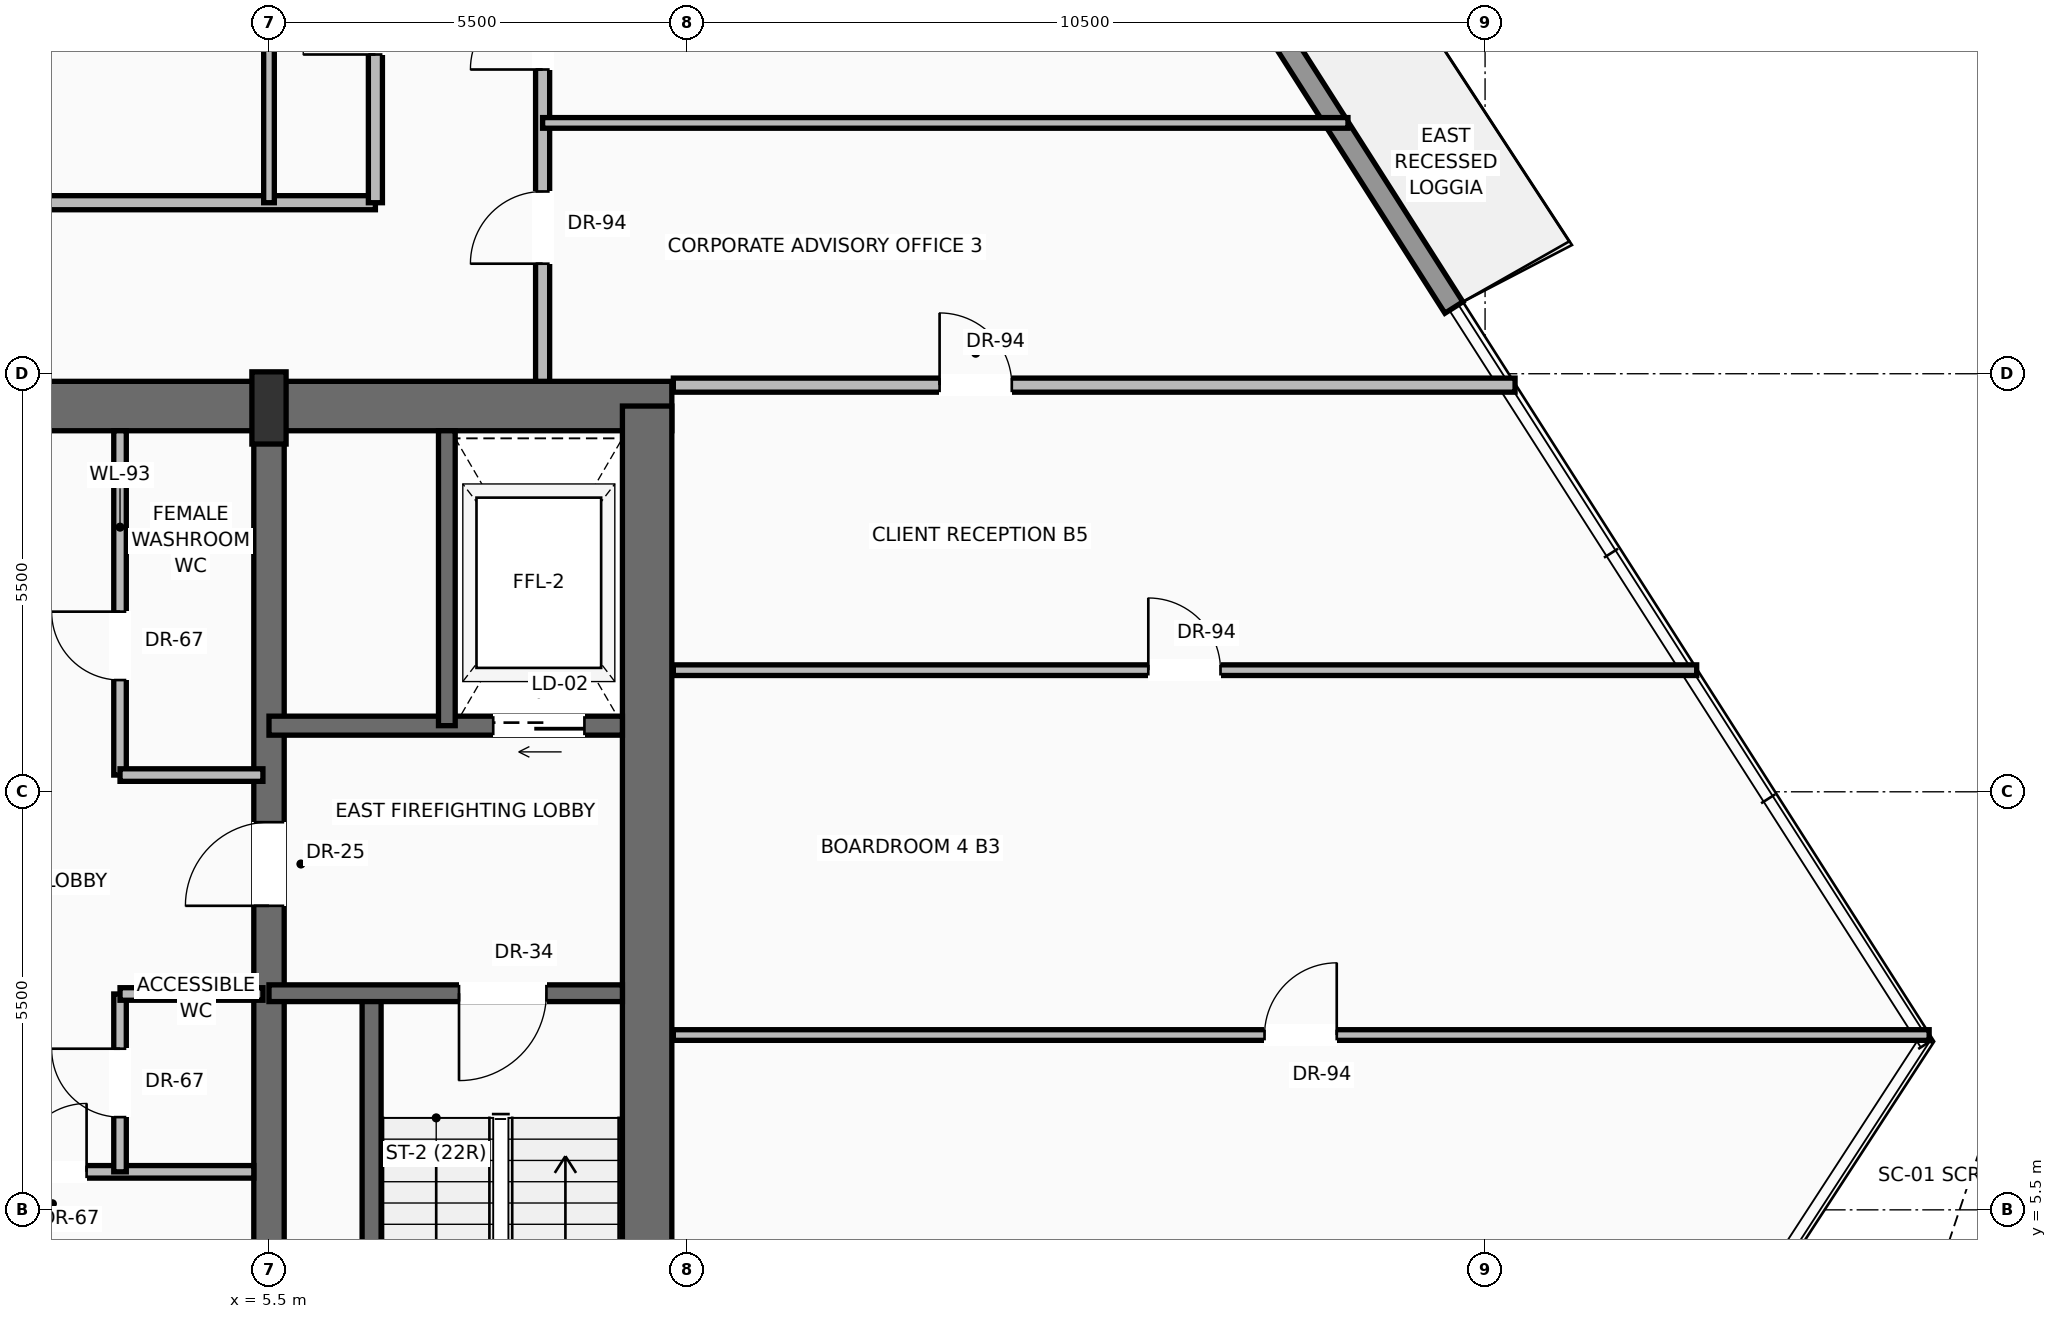
"""IFC4 building model, lengths in metres.
Left out: names, types, materials, properties, quantities, classifications, styles, units other than length and angle.
Written with IfcOpenShell. Run it as: python <this file> out.ifc"""

import sys

from ifc_helpers import new_model, si_unit, direction, frame, frame_2d, origin, origin_2d, place, context, subcontext, project, spatial, rectangle, extrude, source, transform, mapped, element, fill, save


model = new_model("IFC4")
c1 = context("Model", 3, precision=1e-05, world=origin(), true_north=direction((0.0, 1.0)))
c2 = subcontext(c1, "Body", "Model", "MODEL_VIEW")
j1 = project(units=[si_unit("LENGTHUNIT", "METRE"), si_unit("PLANEANGLEUNIT", "RADIAN")], contexts=[c1])
p1 = place(None, origin())
s1 = spatial("IfcSite", under=j1, at=p1, CompositionType="ELEMENT")
p2 = place(p1, origin())
s2 = spatial("IfcBuilding", under=s1, at=p2, CompositionType="ELEMENT")
p3 = place(p2, frame((0.0, 0.0, 140.4)))
s3 = spatial("IfcBuildingStorey", under=s2, at=p3, CompositionType="ELEMENT", Elevation=140.4)
p4 = place(p3, frame((-10.8, 16.075, 0.0), z_axis=(0.0, 0.0, 1.0), x_axis=(1.0, 0.0, 0.0)))
e1 = element("IfcWall", 1, at=p4, inside=s3, PredefinedType="SHEAR", context=c2, shape_type="SweptSolid", body=[
    extrude(rectangle(XDim=21.6, YDim=0.65, at=frame_2d((10.8, 0.0))), origin(), (0.0, 0.0, 1.0), 3.47),
])
p5 = place(p4, frame((3.37, 0.0, 0.0)))
e2 = element("IfcOpeningElement", 2, at=p5, cuts=e1, PredefinedType="OPENING", context=c2, shape_type="SweptSolid", body=[
    extrude(rectangle(XDim=1.3, YDim=2.3, at=frame_2d((0.65, 1.15))), frame((0.0, 0.335, 0.0), z_axis=(0.0, -1.0, 0.0), x_axis=(1.0, 0.0, 0.0)), (0.0, 0.0, 1.0), 0.67),
])
p6 = place(p4, frame((9.8, 0.0, 0.0)))
e3 = element("IfcOpeningElement", 3, at=p6, cuts=e1, PredefinedType="OPENING", context=c2, shape_type="SweptSolid", body=[
    extrude(rectangle(XDim=2.0, YDim=2.4, at=frame_2d((1.0, 1.2))), frame((0.0, 0.335, 0.0), z_axis=(0.0, -1.0, 0.0), x_axis=(1.0, 0.0, 0.0)), (0.0, 0.0, 1.0), 0.67),
])
p7 = place(p3, frame((10.475, 0.525, 0.0), z_axis=(0.0, 0.0, 1.0), x_axis=(0.0, 1.0, 0.0)))
e4 = element("IfcWall", 4, at=p7, inside=s3, PredefinedType="SHEAR", context=c2, shape_type="SweptSolid", body=[
    extrude(rectangle(XDim=15.55, YDim=0.65, at=frame_2d((7.775, 0.0))), origin(), (0.0, 0.0, 1.0), 3.47),
])
p8 = place(p3, frame((5.5, 0.525, 0.0), z_axis=(0.0, 0.0, 1.0), x_axis=(0.0, 1.0, 0.0)))
e5 = element("IfcWall", 5, at=p8, inside=s3, PredefinedType="SHEAR", context=c2, shape_type="SweptSolid", body=[
    extrude(rectangle(XDim=15.55, YDim=0.4, at=frame_2d((7.775, 0.0))), origin(), (0.0, 0.0, 1.0), 3.47),
])
p9 = place(p8, frame((8.975, 0.0, 0.0)))
e6 = element("IfcOpeningElement", 6, at=p9, cuts=e5, PredefinedType="OPENING", context=c2, shape_type="SweptSolid", body=[
    extrude(rectangle(XDim=1.1, YDim=2.2, at=frame_2d((0.55, 1.1))), frame((0.0, 0.21, 0.0), z_axis=(0.0, -1.0, 0.0), x_axis=(1.0, 0.0, 0.0)), (0.0, 0.0, 1.0), 0.42),
])
m1 = source(origin(), c2, "Body", "SweptSolid", [
    extrude(rectangle(XDim=0.45, YDim=0.95, at=origin_2d()), origin(), (0.0, 0.0, 1.0), 3.7),
])
p10 = place(p3, frame((5.5, 16.05, 0.0), z_axis=(0.0, 0.0, 1.0), x_axis=(1.0, 0.0, 0.0)))
e7 = element("IfcColumn", 7, at=p10, inside=s3, PredefinedType="PILASTER", context=c2, shape_type="MappedRepresentation", body=[
    mapped(m1, transform((0.0, 0.0, 0.0), scale=1.0)),
])
p11 = place(p3, frame((11.345, 32.663, 0.0), z_axis=(0.0, 0.0, 1.0), x_axis=(0.537390272984, -0.843333679217, 0.0)))
e8 = element("IfcWall", 8, at=p11, inside=s3, PredefinedType="SOLIDWALL", context=c2, shape_type="SweptSolid", body=[
    extrude(rectangle(XDim=18.133, YDim=0.28, at=frame_2d((9.066, 0.0))), origin(), (0.0, 0.0, 1.0), 3.05),
])
p12 = place(p11, frame((4.352, 0.0, 0.0)))
e9 = element("IfcOpeningElement", 9, at=p12, cuts=e8, PredefinedType="OPENING", context=c2, shape_type="SweptSolid", body=[
    extrude(rectangle(XDim=1.6, YDim=2.35, at=frame_2d((0.8, 1.175))), frame((0.0, 0.15, 0.0), z_axis=(0.0, -1.0, 0.0), x_axis=(1.0, 0.0, 0.0)), (0.0, 0.0, 1.0), 0.3),
])
p13 = place(p11, frame((12.33, 0.0, 0.9)))
e10 = element("IfcOpeningElement", 10, at=p13, cuts=e8, PredefinedType="OPENING", context=c2, shape_type="SweptSolid", body=[
    extrude(rectangle(XDim=1.55, YDim=1.85, at=frame_2d((0.775, 0.925))), frame((0.0, 0.15, 0.0), z_axis=(0.0, -1.0, 0.0), x_axis=(1.0, 0.0, 0.0)), (0.0, 0.0, 1.0), 0.3),
])
p14 = place(p3, frame((6.85, 0.85, 0.0), z_axis=(0.0, 0.0, 1.0), x_axis=(0.0, 1.0, 0.0)))
e11 = element("IfcWall", 11, at=p14, inside=s3, PredefinedType="SOLIDWALL", context=c2, shape_type="SweptSolid", body=[
    extrude(rectangle(XDim=7.5, YDim=0.25, at=frame_2d((3.75, 0.0))), origin(), (0.0, 0.0, 1.0), 3.47),
])
p15 = place(p3, frame((10.15, 8.35, 0.0), z_axis=(0.0, 0.0, 1.0), x_axis=(-1.0, 0.0, 0.0)))
e12 = element("IfcWall", 12, at=p15, inside=s3, PredefinedType="SOLIDWALL", context=c2, shape_type="SweptSolid", body=[
    extrude(rectangle(XDim=4.65, YDim=0.22, at=frame_2d((2.325, 0.0))), origin(), (0.0, 0.0, 1.0), 3.47),
])
p16 = place(p15, frame((1.0, 0.0, 0.0)))
e13 = element("IfcOpeningElement", 13, at=p16, cuts=e12, PredefinedType="OPENING", context=c2, shape_type="SweptSolid", body=[
    extrude(rectangle(XDim=1.15, YDim=2.2, at=frame_2d((0.575, 1.1))), frame((0.0, 0.12, 0.0), z_axis=(0.0, -1.0, 0.0), x_axis=(1.0, 0.0, 0.0)), (0.0, 0.0, 1.0), 0.24),
])
p17 = place(p3, frame((10.15, 11.87, 0.0), z_axis=(0.0, 0.0, 1.0), x_axis=(-1.0, 0.0, 0.0)))
e14 = element("IfcWall", 14, at=p17, inside=s3, PredefinedType="SOLIDWALL", context=c2, shape_type="SweptSolid", body=[
    extrude(rectangle(XDim=4.65, YDim=0.25, at=frame_2d((2.325, 0.0))), origin(), (0.0, 0.0, 1.0), 3.47),
])
p18 = place(p17, frame((0.5, 0.0, 0.0)))
e15 = element("IfcOpeningElement", 15, at=p18, cuts=e14, PredefinedType="OPENING", context=c2, shape_type="SweptSolid", body=[
    extrude(rectangle(XDim=1.2, YDim=2.25, at=frame_2d((0.6, 1.125))), frame((0.0, 0.135, 0.0), z_axis=(0.0, -1.0, 0.0), x_axis=(1.0, 0.0, 0.0)), (0.0, 0.0, 1.0), 0.27),
])
p19 = place(p3, frame((7.84, 11.87, 0.0), z_axis=(0.0, 0.0, 1.0), x_axis=(0.0, 1.0, 0.0)))
e16 = element("IfcWall", 16, at=p19, inside=s3, PredefinedType="SOLIDWALL", context=c2, shape_type="SweptSolid", body=[
    extrude(rectangle(XDim=3.88, YDim=0.22, at=frame_2d((1.94, 0.0))), origin(), (0.0, 0.0, 1.0), 3.47),
])
p20 = place(p3, frame((1.82, 6.0, 0.0), z_axis=(0.0, 0.0, 1.0), x_axis=(1.0, 0.0, 0.0)))
e17 = element("IfcWall", 17, at=p20, inside=s3, PredefinedType="PARTITIONING", context=c2, shape_type="SweptSolid", body=[
    extrude(rectangle(XDim=3.48, YDim=0.165, at=frame_2d((1.74, 0.0))), origin(), (0.0, 0.0, 1.0), 3.462),
])
p21 = place(p20, frame((0.38, 0.0, 0.0)))
e18 = element("IfcOpeningElement", 18, at=p21, cuts=e17, PredefinedType="OPENING", context=c2, shape_type="SweptSolid", body=[
    extrude(rectangle(XDim=0.9, YDim=2.1, at=frame_2d((0.45, 1.05))), frame((0.0, 0.093, 0.0), z_axis=(0.0, -1.0, 0.0), x_axis=(1.0, 0.0, 0.0)), (0.0, 0.0, 1.0), 0.185),
])
p22 = place(p3, frame((3.54, 6.0, 0.0), z_axis=(0.0, 0.0, 1.0), x_axis=(0.0, 1.0, 0.0)))
e19 = element("IfcWall", 19, at=p22, inside=s3, PredefinedType="PARTITIONING", context=c2, shape_type="SweptSolid", body=[
    extrude(rectangle(XDim=2.34, YDim=0.165, at=frame_2d((1.17, 0.0))), origin(), (0.0, 0.0, 1.0), 3.462),
])
p23 = place(p22, frame((0.72, 0.0, 0.0)))
e20 = element("IfcOpeningElement", 20, at=p23, cuts=e19, PredefinedType="OPENING", context=c2, shape_type="SweptSolid", body=[
    extrude(rectangle(XDim=0.9, YDim=2.1, at=frame_2d((0.45, 1.05))), frame((0.0, 0.093, 0.0), z_axis=(0.0, -1.0, 0.0), x_axis=(1.0, 0.0, 0.0)), (0.0, 0.0, 1.0), 0.185),
])
p24 = place(p3, frame((3.54, 8.34, 0.0), z_axis=(0.0, 0.0, 1.0), x_axis=(1.0, 0.0, 0.0)))
e21 = element("IfcWall", 21, at=p24, inside=s3, PredefinedType="PARTITIONING", context=c2, shape_type="SweptSolid", body=[
    extrude(rectangle(XDim=1.88, YDim=0.165, at=frame_2d((0.94, 0.0))), origin(), (0.0, 0.0, 1.0), 3.462),
])
p25 = place(p3, frame((3.54, 11.22, 0.0), z_axis=(0.0, 0.0, 1.0), x_axis=(0.0, 1.0, 0.0)))
e22 = element("IfcWall", 22, at=p25, inside=s3, PredefinedType="PARTITIONING", context=c2, shape_type="SweptSolid", body=[
    extrude(rectangle(XDim=4.53, YDim=0.165, at=frame_2d((2.265, 0.0))), origin(), (0.0, 0.0, 1.0), 3.462),
])
p26 = place(p25, frame((1.25, 0.0, 0.0)))
e23 = element("IfcOpeningElement", 23, at=p26, cuts=e22, PredefinedType="OPENING", context=c2, shape_type="SweptSolid", body=[
    extrude(rectangle(XDim=0.9, YDim=2.1, at=frame_2d((0.45, 1.05))), frame((0.0, 0.093, 0.0), z_axis=(0.0, -1.0, 0.0), x_axis=(1.0, 0.0, 0.0)), (0.0, 0.0, 1.0), 0.185),
])
p27 = place(p3, frame((3.54, 11.22, 0.0), z_axis=(0.0, 0.0, 1.0), x_axis=(1.0, 0.0, 0.0)))
e24 = element("IfcWall", 24, at=p27, inside=s3, PredefinedType="PARTITIONING", context=c2, shape_type="SweptSolid", body=[
    extrude(rectangle(XDim=1.88, YDim=0.165, at=frame_2d((0.94, 0.0))), origin(), (0.0, 0.0, 1.0), 3.462),
])
p28 = place(p3, frame((-7.2, 18.75, 0.0), z_axis=(0.0, 0.0, 1.0), x_axis=(1.0, 0.0, 0.0)))
e25 = element("IfcWall", 25, at=p28, inside=s3, PredefinedType="PARTITIONING", context=c2, shape_type="SweptSolid", body=[
    extrude(rectangle(XDim=14.1, YDim=0.185, at=frame_2d((7.05, 0.0))), origin(), (0.0, 0.0, 1.0), 2.846),
])
p29 = place(p28, frame((6.575, 0.0, 0.0)))
e26 = element("IfcOpeningElement", 26, at=p29, cuts=e25, PredefinedType="OPENING", context=c2, shape_type="SweptSolid", body=[
    extrude(rectangle(XDim=0.95, YDim=2.2, at=frame_2d((0.475, 1.1))), frame((0.0, 0.103, 0.0), z_axis=(0.0, -1.0, 0.0), x_axis=(1.0, 0.0, 0.0)), (0.0, 0.0, 1.0), 0.205),
])
p30 = place(p3, frame((6.9, 18.75, 0.0), z_axis=(0.0, 0.0, 1.0), x_axis=(0.0, 1.0, 0.0)))
e27 = element("IfcWall", 27, at=p30, inside=s3, PredefinedType="PARTITIONING", context=c2, shape_type="SweptSolid", body=[
    extrude(rectangle(XDim=4.85, YDim=0.185, at=frame_2d((2.425, 0.0))), origin(), (0.0, 0.0, 1.0), 3.462),
])
p31 = place(p30, frame((1.95, 0.0, 0.0)))
e28 = element("IfcOpeningElement", 28, at=p31, cuts=e27, PredefinedType="OPENING", context=c2, shape_type="SweptSolid", body=[
    extrude(rectangle(XDim=0.95, YDim=2.2, at=frame_2d((0.475, 1.1))), frame((0.0, 0.103, 0.0), z_axis=(0.0, -1.0, 0.0), x_axis=(1.0, 0.0, 0.0)), (0.0, 0.0, 1.0), 0.205),
])
p32 = place(p3, frame((9.1, 16.4, 0.0), z_axis=(0.0, 0.0, 1.0), x_axis=(0.0, 1.0, 0.0)))
e29 = element("IfcWall", 29, at=p32, inside=s3, PredefinedType="PARTITIONING", context=c2, shape_type="SweptSolid", body=[
    extrude(rectangle(XDim=7.2, YDim=0.185, at=frame_2d((3.6, 0.0))), origin(), (0.0, 0.0, 1.0), 3.462),
])
p33 = place(p32, frame((4.103, 0.0, 0.0)))
e30 = element("IfcOpeningElement", 30, at=p33, cuts=e29, PredefinedType="OPENING", context=c2, shape_type="SweptSolid", body=[
    extrude(rectangle(XDim=0.95, YDim=2.2, at=frame_2d((0.475, 1.1))), frame((0.0, 0.103, 0.0), z_axis=(0.0, -1.0, 0.0), x_axis=(1.0, 0.0, 0.0)), (0.0, 0.0, 1.0), 0.205),
])
p34 = place(p32, frame((1.548, 0.0, 0.0)))
e31 = element("IfcOpeningElement", 31, at=p34, cuts=e29, PredefinedType="OPENING", context=c2, shape_type="SweptSolid", body=[
    extrude(rectangle(XDim=0.95, YDim=2.2, at=frame_2d((0.475, 1.1))), frame((0.0, 0.103, 0.0), z_axis=(0.0, -1.0, 0.0), x_axis=(1.0, 0.0, 0.0)), (0.0, 0.0, 1.0), 0.205),
])
p35 = place(p3, frame((10.82, 16.35, 0.0), z_axis=(0.0, 0.0, 1.0), x_axis=(1.0, 0.0, 0.0)))
e32 = element("IfcWall", 32, at=p35, inside=s3, PredefinedType="PARTITIONING", context=c2, shape_type="SweptSolid", body=[
    extrude(rectangle(XDim=11.074, YDim=0.185, at=frame_2d((5.537, 0.0))), origin(), (0.0, 0.0, 1.0), 3.462),
])
p36 = place(p35, frame((3.503, 0.0, 0.0)))
e33 = element("IfcOpeningElement", 33, at=p36, cuts=e32, PredefinedType="OPENING", context=c2, shape_type="SweptSolid", body=[
    extrude(rectangle(XDim=0.95, YDim=2.2, at=frame_2d((0.475, 1.1))), frame((0.0, 0.103, 0.0), z_axis=(0.0, -1.0, 0.0), x_axis=(1.0, 0.0, 0.0)), (0.0, 0.0, 1.0), 0.205),
])
p37 = place(p3, frame((5.5, 18.75, 0.0), z_axis=(0.0, 0.0, 1.0), x_axis=(0.0, 1.0, 0.0)))
e34 = element("IfcWall", 34, at=p37, inside=s3, PredefinedType="PARTITIONING", context=c2, shape_type="SweptSolid", body=[
    extrude(rectangle(XDim=13.75, YDim=0.14, at=frame_2d((6.875, 0.0))), origin(), (0.0, 0.0, 1.0), 2.846),
])
p38 = place(p3, frame((10.82, 7.8, 0.0), z_axis=(0.0, 0.0, 1.0), x_axis=(1.0, 0.0, 0.0)))
e35 = element("IfcWall", 35, at=p38, inside=s3, PredefinedType="PARTITIONING", context=c2, shape_type="SweptSolid", body=[
    extrude(rectangle(XDim=16.523, YDim=0.14, at=frame_2d((8.261, 0.0))), origin(), (0.0, 0.0, 1.0), 3.462),
])
p39 = place(p38, frame((7.778, 0.0, 0.0)))
e36 = element("IfcOpeningElement", 36, at=p39, cuts=e35, PredefinedType="OPENING", context=c2, shape_type="SweptSolid", body=[
    extrude(rectangle(XDim=0.95, YDim=2.2, at=frame_2d((0.475, 1.1))), frame((0.0, 0.08, 0.0), z_axis=(0.0, -1.0, 0.0), x_axis=(1.0, 0.0, 0.0)), (0.0, 0.0, 1.0), 0.16),
])
p40 = place(p3, frame((10.82, 12.6, 0.0), z_axis=(0.0, 0.0, 1.0), x_axis=(1.0, 0.0, 0.0)))
e37 = element("IfcWall", 37, at=p40, inside=s3, PredefinedType="PARTITIONING", context=c2, shape_type="SweptSolid", body=[
    extrude(rectangle(XDim=13.464, YDim=0.14, at=frame_2d((6.732, 0.0))), origin(), (0.0, 0.0, 1.0), 3.462),
])
p41 = place(p40, frame((6.249, 0.0, 0.0)))
e38 = element("IfcOpeningElement", 38, at=p41, cuts=e37, PredefinedType="OPENING", context=c2, shape_type="SweptSolid", body=[
    extrude(rectangle(XDim=0.95, YDim=2.2, at=frame_2d((0.475, 1.1))), frame((0.0, 0.08, 0.0), z_axis=(0.0, -1.0, 0.0), x_axis=(1.0, 0.0, 0.0)), (0.0, 0.0, 1.0), 0.16),
])
p42 = place(p3, frame((9.1, 19.8, 0.0), z_axis=(0.0, 0.0, 1.0), x_axis=(1.0, 0.0, 0.0)))
e39 = element("IfcWall", 39, at=p42, inside=s3, PredefinedType="PARTITIONING", context=c2, shape_type="SweptSolid", body=[
    extrude(rectangle(XDim=10.596, YDim=0.14, at=frame_2d((5.298, 0.0))), origin(), (0.0, 0.0, 1.0), 3.462),
])
m2 = source(origin(), c2, "Body", "SweptSolid", [
    extrude(rectangle(XDim=1.15, YDim=2.2, at=frame_2d((0.575, 1.1))), frame((0.0, 0.025, 0.0), z_axis=(0.0, -1.0, 0.0), x_axis=(1.0, 0.0, 0.0)), (0.0, 0.0, 1.0), 0.05),
])
p43 = place(p16, origin())
e40 = element("IfcDoor", 40, at=p43, inside=s3, OperationType="SINGLE_SWING_RIGHT", PredefinedType="DOOR", context=c2, shape_type="MappedRepresentation", body=[
    mapped(m2, transform((0.0, 0.0, 0.0), scale=1.0)),
])
fill(e13, e40)
m3 = source(origin(), c2, "Body", "SweptSolid", [
    extrude(rectangle(XDim=1.1, YDim=2.2, at=frame_2d((0.55, 1.1))), frame((0.0, 0.025, 0.0), z_axis=(0.0, -1.0, 0.0), x_axis=(1.0, 0.0, 0.0)), (0.0, 0.0, 1.0), 0.05),
])
p44 = place(p9, origin())
e41 = element("IfcDoor", 41, at=p44, inside=s3, OperationType="SINGLE_SWING_LEFT", PredefinedType="DOOR", context=c2, shape_type="MappedRepresentation", body=[
    mapped(m3, transform((0.0, 0.0, 0.0), scale=1.0)),
])
fill(e6, e41)
m4 = source(origin(), c2, "Body", "SweptSolid", [
    extrude(rectangle(XDim=1.2, YDim=2.25, at=frame_2d((0.6, 1.125))), frame((0.0, 0.025, 0.0), z_axis=(0.0, -1.0, 0.0), x_axis=(1.0, 0.0, 0.0)), (0.0, 0.0, 1.0), 0.05),
])
p45 = place(p18, origin())
e42 = element("IfcDoor", 42, at=p45, inside=s3, OperationType="SLIDING_TO_RIGHT", PredefinedType="DOOR", context=c2, shape_type="MappedRepresentation", body=[
    mapped(m4, transform((0.0, 0.0, 0.0), scale=1.0)),
])
fill(e15, e42)
m5 = source(origin(), c2, "Body", "SweptSolid", [
    extrude(rectangle(XDim=0.9, YDim=2.1, at=frame_2d((0.45, 1.05))), frame((0.0, 0.025, 0.0), z_axis=(0.0, -1.0, 0.0), x_axis=(1.0, 0.0, 0.0)), (0.0, 0.0, 1.0), 0.05),
])
p46 = place(p21, origin())
e43 = element("IfcDoor", 43, at=p46, inside=s3, OperationType="SINGLE_SWING_RIGHT", PredefinedType="DOOR", context=c2, shape_type="MappedRepresentation", body=[
    mapped(m5, transform((0.0, 0.0, 0.0), scale=1.0)),
])
fill(e18, e43)
p47 = place(p23, origin())
e44 = element("IfcDoor", 44, at=p47, inside=s3, OperationType="SINGLE_SWING_RIGHT", PredefinedType="DOOR", context=c2, shape_type="MappedRepresentation", body=[
    mapped(m5, transform((0.0, 0.0, 0.0), scale=1.0)),
])
fill(e20, e44)
p48 = place(p26, origin())
e45 = element("IfcDoor", 45, at=p48, inside=s3, OperationType="SINGLE_SWING_RIGHT", PredefinedType="DOOR", context=c2, shape_type="MappedRepresentation", body=[
    mapped(m5, transform((0.0, 0.0, 0.0), scale=1.0)),
])
fill(e23, e45)
m6 = source(origin(), c2, "Body", "SweptSolid", [
    extrude(rectangle(XDim=0.95, YDim=2.2, at=frame_2d((0.475, 1.1))), frame((0.0, 0.025, 0.0), z_axis=(0.0, -1.0, 0.0), x_axis=(1.0, 0.0, 0.0)), (0.0, 0.0, 1.0), 0.05),
])
p49 = place(p33, origin())
e46 = element("IfcDoor", 46, at=p49, inside=s3, OperationType="SINGLE_SWING_LEFT", PredefinedType="DOOR", context=c2, shape_type="MappedRepresentation", body=[
    mapped(m6, transform((0.0, 0.0, 0.0), scale=1.0)),
])
fill(e30, e46)
p50 = place(p36, origin())
e47 = element("IfcDoor", 47, at=p50, inside=s3, OperationType="SINGLE_SWING_LEFT", PredefinedType="DOOR", context=c2, shape_type="MappedRepresentation", body=[
    mapped(m6, transform((0.0, 0.0, 0.0), scale=1.0)),
])
fill(e33, e47)
p51 = place(p34, origin())
e48 = element("IfcDoor", 48, at=p51, inside=s3, OperationType="SINGLE_SWING_LEFT", PredefinedType="DOOR", context=c2, shape_type="MappedRepresentation", body=[
    mapped(m6, transform((0.0, 0.0, 0.0), scale=1.0)),
])
fill(e31, e48)
p52 = place(p31, origin())
e49 = element("IfcDoor", 49, at=p52, inside=s3, OperationType="SINGLE_SWING_LEFT", PredefinedType="DOOR", context=c2, shape_type="MappedRepresentation", body=[
    mapped(m6, transform((0.0, 0.0, 0.0), scale=1.0)),
])
fill(e28, e49)
p53 = place(p41, origin())
e50 = element("IfcDoor", 50, at=p53, inside=s3, OperationType="SINGLE_SWING_LEFT", PredefinedType="DOOR", context=c2, shape_type="MappedRepresentation", body=[
    mapped(m6, transform((0.0, 0.0, 0.0), scale=1.0)),
])
fill(e38, e50)
p54 = place(p39, origin())
e51 = element("IfcDoor", 51, at=p54, inside=s3, OperationType="SINGLE_SWING_RIGHT", PredefinedType="DOOR", context=c2, shape_type="MappedRepresentation", body=[
    mapped(m6, transform((0.0, 0.0, 0.0), scale=1.0)),
])
fill(e36, e51)
save(model, sys.argv[1])
